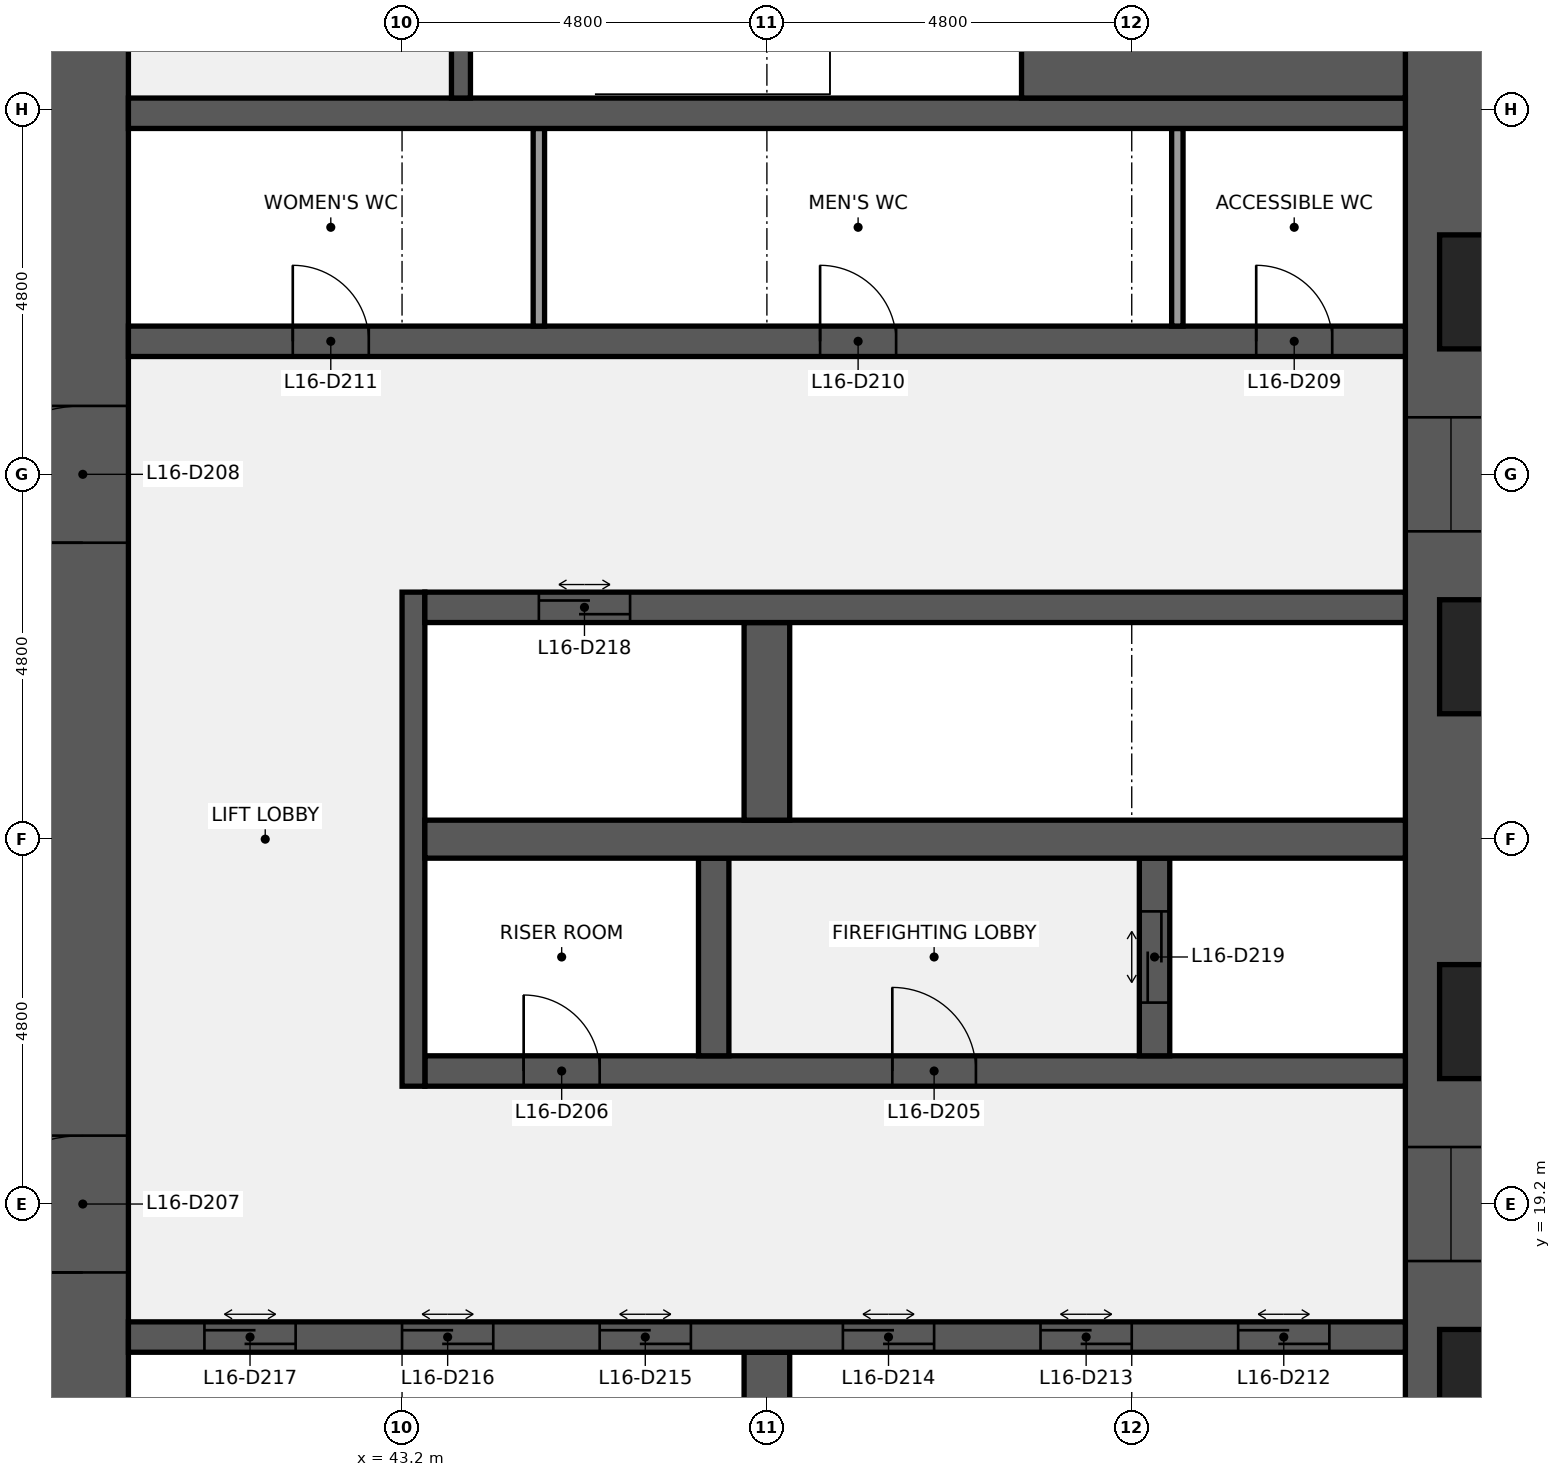
"""IFC4 building model, lengths in metres.
Left out: names, types, materials, properties, quantities, classifications, styles, units other than length and angle.
Written with IfcOpenShell. Run it as: python <this file> out.ifc"""

import sys

from ifc_helpers import new_model, si_unit, direction, frame, frame_2d, origin, place, context, subcontext, project, spatial, rectangle, extrude, element, fill, save


model = new_model("IFC4")
c1 = context("Model", 3, precision=1e-05, world=origin(), true_north=direction((0.0, 1.0)))
c2 = subcontext(c1, "Body", "Model", "MODEL_VIEW")
j1 = project(units=[si_unit("LENGTHUNIT", "METRE"), si_unit("PLANEANGLEUNIT", "RADIAN")], contexts=[c1])
p1 = place(None, origin())
s1 = spatial("IfcSite", under=j1, at=p1, CompositionType="ELEMENT")
p2 = place(p1, origin())
s2 = spatial("IfcBuilding", under=s1, at=p2, CompositionType="ELEMENT")
p3 = place(p2, frame((0.0, 0.0, 75.0)))
s3 = spatial("IfcBuildingStorey", under=s2, at=p3, CompositionType="ELEMENT", Elevation=75.0)
p4 = place(p3, frame((57.0, 38.4, 0.0), z_axis=(0.0, 0.0, 1.0), x_axis=(0.0, -1.0, 0.0)))
e1 = element("IfcWall", 1, at=p4, inside=s3, PredefinedType="SHEAR", context=c2, shape_type="SweptSolid", body=[
    extrude(rectangle(XDim=28.8, YDim=1.2, at=frame_2d((14.4, 0.0))), origin(), (0.0, 0.0, 1.0), 3.84),
])
p5 = place(p4, frame((18.45, 0.0, 0.9)))
e2 = element("IfcOpeningElement", 2, at=p5, cuts=e1, PredefinedType="OPENING", context=c2, shape_type="SweptSolid", body=[
    extrude(rectangle(XDim=1.5, YDim=1.5, at=frame_2d((0.75, 0.75))), frame((0.0, 0.61, 0.0), z_axis=(0.0, -1.0, 0.0), x_axis=(1.0, 0.0, 0.0)), (0.0, 0.0, 1.0), 1.22),
])
p6 = place(p4, frame((8.85, 0.0, 0.9)))
e3 = element("IfcOpeningElement", 3, at=p6, cuts=e1, PredefinedType="OPENING", context=c2, shape_type="SweptSolid", body=[
    extrude(rectangle(XDim=1.5, YDim=1.5, at=frame_2d((0.75, 0.75))), frame((0.0, 0.61, 0.0), z_axis=(0.0, -1.0, 0.0), x_axis=(1.0, 0.0, 0.0)), (0.0, 0.0, 1.0), 1.22),
])
p7 = place(p3, frame((39.0, 9.6, 0.0), z_axis=(0.0, 0.0, 1.0), x_axis=(0.0, 1.0, 0.0)))
e4 = element("IfcWall", 4, at=p7, inside=s3, PredefinedType="SHEAR", context=c2, shape_type="SweptSolid", body=[
    extrude(rectangle(XDim=28.8, YDim=1.2, at=frame_2d((14.4, 0.0))), origin(), (0.0, 0.0, 1.0), 3.84),
])
p8 = place(p7, frame((8.7, 0.0, 0.0)))
e5 = element("IfcOpeningElement", 5, at=p8, cuts=e4, PredefinedType="OPENING", context=c2, shape_type="SweptSolid", body=[
    extrude(rectangle(XDim=1.8, YDim=2.1, at=frame_2d((0.9, 1.05))), frame((0.0, 0.61, 0.0), z_axis=(0.0, -1.0, 0.0), x_axis=(1.0, 0.0, 0.0)), (0.0, 0.0, 1.0), 1.22),
])
p9 = place(p7, frame((18.3, 0.0, 0.0)))
e6 = element("IfcOpeningElement", 6, at=p9, cuts=e4, PredefinedType="OPENING", context=c2, shape_type="SweptSolid", body=[
    extrude(rectangle(XDim=1.8, YDim=2.1, at=frame_2d((0.9, 1.05))), frame((0.0, 0.61, 0.0), z_axis=(0.0, -1.0, 0.0), x_axis=(1.0, 0.0, 0.0)), (0.0, 0.0, 1.0), 1.22),
])
p10 = place(p3, frame((48.0, 14.65, 0.0), z_axis=(0.0, 0.0, 1.0), x_axis=(0.0, 1.0, 0.0)))
e7 = element("IfcWall", 7, at=p10, inside=s3, PredefinedType="SHEAR", context=c2, shape_type="SweptSolid", body=[
    extrude(rectangle(XDim=2.6, YDim=0.6, at=frame_2d((1.3, 0.0))), origin(), (0.0, 0.0, 1.0), 3.84),
])
p11 = place(p3, frame((39.6, 17.45, 0.0), z_axis=(0.0, 0.0, 1.0), x_axis=(1.0, 0.0, 0.0)))
e8 = element("IfcWall", 8, at=p11, inside=s3, PredefinedType="SHEAR", context=c2, shape_type="SweptSolid", body=[
    extrude(rectangle(XDim=16.8, YDim=0.4, at=frame_2d((8.4, 0.0))), origin(), (0.0, 0.0, 1.0), 3.84),
])
p12 = place(p11, frame((14.6, 0.0, 0.0)))
e9 = element("IfcOpeningElement", 9, at=p12, cuts=e8, PredefinedType="OPENING", context=c2, shape_type="SweptSolid", body=[
    extrude(rectangle(XDim=1.2, YDim=2.1, at=frame_2d((0.6, 1.05))), frame((0.0, 0.21, 0.0), z_axis=(0.0, -1.0, 0.0), x_axis=(1.0, 0.0, 0.0)), (0.0, 0.0, 1.0), 0.42),
])
p13 = place(p11, frame((12.0, 0.0, 0.0)))
e10 = element("IfcOpeningElement", 10, at=p13, cuts=e8, PredefinedType="OPENING", context=c2, shape_type="SweptSolid", body=[
    extrude(rectangle(XDim=1.2, YDim=2.1, at=frame_2d((0.6, 1.05))), frame((0.0, 0.21, 0.0), z_axis=(0.0, -1.0, 0.0), x_axis=(1.0, 0.0, 0.0)), (0.0, 0.0, 1.0), 0.42),
])
p14 = place(p11, frame((9.4, 0.0, 0.0)))
e11 = element("IfcOpeningElement", 11, at=p14, cuts=e8, PredefinedType="OPENING", context=c2, shape_type="SweptSolid", body=[
    extrude(rectangle(XDim=1.2, YDim=2.1, at=frame_2d((0.6, 1.05))), frame((0.0, 0.21, 0.0), z_axis=(0.0, -1.0, 0.0), x_axis=(1.0, 0.0, 0.0)), (0.0, 0.0, 1.0), 0.42),
])
p15 = place(p11, frame((6.2, 0.0, 0.0)))
e12 = element("IfcOpeningElement", 12, at=p15, cuts=e8, PredefinedType="OPENING", context=c2, shape_type="SweptSolid", body=[
    extrude(rectangle(XDim=1.2, YDim=2.1, at=frame_2d((0.6, 1.05))), frame((0.0, 0.21, 0.0), z_axis=(0.0, -1.0, 0.0), x_axis=(1.0, 0.0, 0.0)), (0.0, 0.0, 1.0), 0.42),
])
p16 = place(p11, frame((3.6, 0.0, 0.0)))
e13 = element("IfcOpeningElement", 13, at=p16, cuts=e8, PredefinedType="OPENING", context=c2, shape_type="SweptSolid", body=[
    extrude(rectangle(XDim=1.2, YDim=2.1, at=frame_2d((0.6, 1.05))), frame((0.0, 0.21, 0.0), z_axis=(0.0, -1.0, 0.0), x_axis=(1.0, 0.0, 0.0)), (0.0, 0.0, 1.0), 0.42),
])
p17 = place(p11, frame((1.0, 0.0, 0.0)))
e14 = element("IfcOpeningElement", 14, at=p17, cuts=e8, PredefinedType="OPENING", context=c2, shape_type="SweptSolid", body=[
    extrude(rectangle(XDim=1.2, YDim=2.1, at=frame_2d((0.6, 1.05))), frame((0.0, 0.21, 0.0), z_axis=(0.0, -1.0, 0.0), x_axis=(1.0, 0.0, 0.0)), (0.0, 0.0, 1.0), 0.42),
])
p18 = place(p3, frame((43.5, 20.95, 0.0), z_axis=(0.0, 0.0, 1.0), x_axis=(1.0, 0.0, 0.0)))
e15 = element("IfcWall", 15, at=p18, inside=s3, PredefinedType="SHEAR", context=c2, shape_type="SweptSolid", body=[
    extrude(rectangle(XDim=12.9, YDim=0.4, at=frame_2d((6.45, 0.0))), origin(), (0.0, 0.0, 1.0), 3.84),
])
p19 = place(p18, frame((6.15, 0.0, 0.0)))
e16 = element("IfcOpeningElement", 16, at=p19, cuts=e15, PredefinedType="OPENING", context=c2, shape_type="SweptSolid", body=[
    extrude(rectangle(XDim=1.1, YDim=2.1, at=frame_2d((0.55, 1.05))), frame((0.0, 0.21, 0.0), z_axis=(0.0, -1.0, 0.0), x_axis=(1.0, 0.0, 0.0)), (0.0, 0.0, 1.0), 0.42),
])
p20 = place(p18, frame((1.3, 0.0, 0.0)))
e17 = element("IfcOpeningElement", 17, at=p20, cuts=e15, PredefinedType="OPENING", context=c2, shape_type="SweptSolid", body=[
    extrude(rectangle(XDim=1.0, YDim=2.1, at=frame_2d((0.5, 1.05))), frame((0.0, 0.21, 0.0), z_axis=(0.0, -1.0, 0.0), x_axis=(1.0, 0.0, 0.0)), (0.0, 0.0, 1.0), 0.42),
])
p21 = place(p3, frame((43.35, 20.75, 0.0), z_axis=(0.0, 0.0, 1.0), x_axis=(0.0, 1.0, 0.0)))
e18 = element("IfcWall", 18, at=p21, inside=s3, PredefinedType="SHEAR", context=c2, shape_type="SweptSolid", body=[
    extrude(rectangle(XDim=6.5, YDim=0.3, at=frame_2d((3.25, 0.0))), origin(), (0.0, 0.0, 1.0), 3.84),
])
p22 = place(p3, frame((53.1, 21.15, 0.0), z_axis=(0.0, 0.0, 1.0), x_axis=(0.0, 1.0, 0.0)))
e19 = element("IfcWall", 19, at=p22, inside=s3, PredefinedType="SHEAR", context=c2, shape_type="SweptSolid", body=[
    extrude(rectangle(XDim=2.6, YDim=0.4, at=frame_2d((1.3, 0.0))), origin(), (0.0, 0.0, 1.0), 3.84),
])
p23 = place(p22, frame((0.7, 0.0, 0.0)))
e20 = element("IfcOpeningElement", 20, at=p23, cuts=e19, PredefinedType="OPENING", context=c2, shape_type="SweptSolid", body=[
    extrude(rectangle(XDim=1.2, YDim=2.1, at=frame_2d((0.6, 1.05))), frame((0.0, 0.21, 0.0), z_axis=(0.0, -1.0, 0.0), x_axis=(1.0, 0.0, 0.0)), (0.0, 0.0, 1.0), 0.42),
])
p24 = place(p3, frame((47.3, 21.15, 0.0), z_axis=(0.0, 0.0, 1.0), x_axis=(0.0, 1.0, 0.0)))
e21 = element("IfcWall", 21, at=p24, inside=s3, PredefinedType="SHEAR", context=c2, shape_type="SweptSolid", body=[
    extrude(rectangle(XDim=2.6, YDim=0.4, at=frame_2d((1.3, 0.0))), origin(), (0.0, 0.0, 1.0), 3.84),
])
p25 = place(p3, frame((43.5, 24.0, 0.0), z_axis=(0.0, 0.0, 1.0), x_axis=(1.0, 0.0, 0.0)))
e22 = element("IfcWall", 22, at=p25, inside=s3, PredefinedType="SHEAR", context=c2, shape_type="SweptSolid", body=[
    extrude(rectangle(XDim=12.9, YDim=0.5, at=frame_2d((6.45, 0.0))), origin(), (0.0, 0.0, 1.0), 3.84),
])
p26 = place(p3, frame((48.0, 24.25, 0.0), z_axis=(0.0, 0.0, 1.0), x_axis=(0.0, 1.0, 0.0)))
e23 = element("IfcWall", 23, at=p26, inside=s3, PredefinedType="SHEAR", context=c2, shape_type="SweptSolid", body=[
    extrude(rectangle(XDim=2.6, YDim=0.6, at=frame_2d((1.3, 0.0))), origin(), (0.0, 0.0, 1.0), 3.84),
])
p27 = place(p3, frame((43.5, 27.05, 0.0), z_axis=(0.0, 0.0, 1.0), x_axis=(1.0, 0.0, 0.0)))
e24 = element("IfcWall", 24, at=p27, inside=s3, PredefinedType="SHEAR", context=c2, shape_type="SweptSolid", body=[
    extrude(rectangle(XDim=12.9, YDim=0.4, at=frame_2d((6.45, 0.0))), origin(), (0.0, 0.0, 1.0), 3.84),
])
p28 = place(p27, frame((1.5, 0.0, 0.0)))
e25 = element("IfcOpeningElement", 25, at=p28, cuts=e24, PredefinedType="OPENING", context=c2, shape_type="SweptSolid", body=[
    extrude(rectangle(XDim=1.2, YDim=2.1, at=frame_2d((0.6, 1.05))), frame((0.0, 0.21, 0.0), z_axis=(0.0, -1.0, 0.0), x_axis=(1.0, 0.0, 0.0)), (0.0, 0.0, 1.0), 0.42),
])
p29 = place(p3, frame((39.6, 30.55, 0.0), z_axis=(0.0, 0.0, 1.0), x_axis=(1.0, 0.0, 0.0)))
e26 = element("IfcWall", 26, at=p29, inside=s3, PredefinedType="SHEAR", context=c2, shape_type="SweptSolid", body=[
    extrude(rectangle(XDim=16.8, YDim=0.4, at=frame_2d((8.4, 0.0))), origin(), (0.0, 0.0, 1.0), 3.84),
])
p30 = place(p29, frame((14.837, 0.0, 0.0)))
e27 = element("IfcOpeningElement", 27, at=p30, cuts=e26, PredefinedType="OPENING", context=c2, shape_type="SweptSolid", body=[
    extrude(rectangle(XDim=1.0, YDim=2.1, at=frame_2d((0.5, 1.05))), frame((0.0, 0.21, 0.0), z_axis=(0.0, -1.0, 0.0), x_axis=(1.0, 0.0, 0.0)), (0.0, 0.0, 1.0), 0.42),
])
p31 = place(p29, frame((9.1, 0.0, 0.0)))
e28 = element("IfcOpeningElement", 28, at=p31, cuts=e26, PredefinedType="OPENING", context=c2, shape_type="SweptSolid", body=[
    extrude(rectangle(XDim=1.0, YDim=2.1, at=frame_2d((0.5, 1.05))), frame((0.0, 0.21, 0.0), z_axis=(0.0, -1.0, 0.0), x_axis=(1.0, 0.0, 0.0)), (0.0, 0.0, 1.0), 0.42),
])
p32 = place(p29, frame((2.163, 0.0, 0.0)))
e29 = element("IfcOpeningElement", 29, at=p32, cuts=e26, PredefinedType="OPENING", context=c2, shape_type="SweptSolid", body=[
    extrude(rectangle(XDim=1.0, YDim=2.1, at=frame_2d((0.5, 1.05))), frame((0.0, 0.21, 0.0), z_axis=(0.0, -1.0, 0.0), x_axis=(1.0, 0.0, 0.0)), (0.0, 0.0, 1.0), 0.42),
])
for number, where, z_axis, x_axis in (
    (30, (53.4, 30.75, 0.0), (0.0, 0.0, 1.0), (0.0, 1.0, 0.0)),
    (31, (45.0, 30.75, 0.0), (0.0, 0.0, 1.0), (0.0, 1.0, 0.0)),
):
    element("IfcWall", number, at=place(p3, frame(where, z_axis=z_axis, x_axis=x_axis)), inside=s3, PredefinedType="PARTITIONING", context=c2, shape_type="SweptSolid", body=[
        extrude(rectangle(XDim=2.6, YDim=0.15, at=frame_2d((1.3, 0.0))), origin(), (0.0, 0.0, 1.0), 3.84),
    ])
p33 = place(p3, frame((39.6, 33.55, 0.0), z_axis=(0.0, 0.0, 1.0), x_axis=(1.0, 0.0, 0.0)))
e32 = element("IfcWall", 32, at=p33, inside=s3, PredefinedType="SHEAR", context=c2, shape_type="SweptSolid", body=[
    extrude(rectangle(XDim=16.8, YDim=0.4, at=frame_2d((8.4, 0.0))), origin(), (0.0, 0.0, 1.0), 3.84),
])
p34 = place(p3, frame((51.35, 35.475, 0.0), z_axis=(0.0, 0.0, 1.0), x_axis=(1.0, 0.0, 0.0)))
e33 = element("IfcWall", 33, at=p34, inside=s3, PredefinedType="SHEAR", context=c2, shape_type="SweptSolid", body=[
    extrude(rectangle(XDim=5.05, YDim=3.45, at=frame_2d((2.525, 0.0))), origin(), (0.0, 0.0, 1.0), 3.84),
])
p35 = place(p3, frame((43.975, 33.75, 0.0), z_axis=(0.0, 0.0, 1.0), x_axis=(0.0, 1.0, 0.0)))
e34 = element("IfcWall", 34, at=p35, inside=s3, PredefinedType="SHEAR", context=c2, shape_type="SweptSolid", body=[
    extrude(rectangle(XDim=3.45, YDim=0.25, at=frame_2d((1.725, 0.0))), origin(), (0.0, 0.0, 1.0), 3.84),
])
p36 = place(p35, frame((1.175, 0.0, 0.0)))
e35 = element("IfcOpeningElement", 35, at=p36, cuts=e34, PredefinedType="OPENING", context=c2, shape_type="SweptSolid", body=[
    extrude(rectangle(XDim=1.1, YDim=2.1, at=frame_2d((0.55, 1.05))), frame((0.0, 0.135, 0.0), z_axis=(0.0, -1.0, 0.0), x_axis=(1.0, 0.0, 0.0)), (0.0, 0.0, 1.0), 0.27),
])
p37 = place(p19, origin())
e36 = element("IfcDoor", 36, at=p37, inside=s3, OperationType="SINGLE_SWING_LEFT", PredefinedType="DOOR", context=c2, shape_type="SweptSolid", body=[
    extrude(rectangle(XDim=1.1, YDim=2.1, at=frame_2d((0.55, 1.05))), frame((0.0, 0.025, 0.0), z_axis=(0.0, -1.0, 0.0), x_axis=(1.0, 0.0, 0.0)), (0.0, 0.0, 1.0), 0.05),
])
fill(e16, e36)
p38 = place(p20, origin())
e37 = element("IfcDoor", 37, at=p38, inside=s3, OperationType="SINGLE_SWING_LEFT", PredefinedType="DOOR", context=c2, shape_type="SweptSolid", body=[
    extrude(rectangle(XDim=1.0, YDim=2.1, at=frame_2d((0.5, 1.05))), frame((0.0, 0.025, 0.0), z_axis=(0.0, -1.0, 0.0), x_axis=(1.0, 0.0, 0.0)), (0.0, 0.0, 1.0), 0.05),
])
fill(e17, e37)
p39 = place(p8, origin())
e38 = element("IfcDoor", 38, at=p39, inside=s3, OperationType="DOUBLE_DOOR_SINGLE_SWING", PredefinedType="DOOR", context=c2, shape_type="SweptSolid", body=[
    extrude(rectangle(XDim=1.8, YDim=2.1, at=frame_2d((0.9, 1.05))), frame((0.0, 0.025, 0.0), z_axis=(0.0, -1.0, 0.0), x_axis=(1.0, 0.0, 0.0)), (0.0, 0.0, 1.0), 0.05),
])
fill(e5, e38)
p40 = place(p9, origin())
e39 = element("IfcDoor", 39, at=p40, inside=s3, OperationType="DOUBLE_DOOR_SINGLE_SWING", PredefinedType="DOOR", context=c2, shape_type="SweptSolid", body=[
    extrude(rectangle(XDim=1.8, YDim=2.1, at=frame_2d((0.9, 1.05))), frame((0.0, 0.025, 0.0), z_axis=(0.0, -1.0, 0.0), x_axis=(1.0, 0.0, 0.0)), (0.0, 0.0, 1.0), 0.05),
])
fill(e6, e39)
p41 = place(p30, origin())
e40 = element("IfcDoor", 40, at=p41, inside=s3, OperationType="SINGLE_SWING_LEFT", PredefinedType="DOOR", context=c2, shape_type="SweptSolid", body=[
    extrude(rectangle(XDim=1.0, YDim=2.1, at=frame_2d((0.5, 1.05))), frame((0.0, 0.025, 0.0), z_axis=(0.0, -1.0, 0.0), x_axis=(1.0, 0.0, 0.0)), (0.0, 0.0, 1.0), 0.05),
])
fill(e27, e40)
p42 = place(p31, origin())
e41 = element("IfcDoor", 41, at=p42, inside=s3, OperationType="SINGLE_SWING_LEFT", PredefinedType="DOOR", context=c2, shape_type="SweptSolid", body=[
    extrude(rectangle(XDim=1.0, YDim=2.1, at=frame_2d((0.5, 1.05))), frame((0.0, 0.025, 0.0), z_axis=(0.0, -1.0, 0.0), x_axis=(1.0, 0.0, 0.0)), (0.0, 0.0, 1.0), 0.05),
])
fill(e28, e41)
p43 = place(p32, origin())
e42 = element("IfcDoor", 42, at=p43, inside=s3, OperationType="SINGLE_SWING_LEFT", PredefinedType="DOOR", context=c2, shape_type="SweptSolid", body=[
    extrude(rectangle(XDim=1.0, YDim=2.1, at=frame_2d((0.5, 1.05))), frame((0.0, 0.025, 0.0), z_axis=(0.0, -1.0, 0.0), x_axis=(1.0, 0.0, 0.0)), (0.0, 0.0, 1.0), 0.05),
])
fill(e29, e42)
p44 = place(p12, origin())
e43 = element("IfcDoor", 43, at=p44, inside=s3, OperationType="DOUBLE_DOOR_SLIDING", PredefinedType="DOOR", context=c2, shape_type="SweptSolid", body=[
    extrude(rectangle(XDim=1.2, YDim=2.1, at=frame_2d((0.6, 1.05))), frame((0.0, 0.025, 0.0), z_axis=(0.0, -1.0, 0.0), x_axis=(1.0, 0.0, 0.0)), (0.0, 0.0, 1.0), 0.05),
])
fill(e9, e43)
p45 = place(p13, origin())
e44 = element("IfcDoor", 44, at=p45, inside=s3, OperationType="DOUBLE_DOOR_SLIDING", PredefinedType="DOOR", context=c2, shape_type="SweptSolid", body=[
    extrude(rectangle(XDim=1.2, YDim=2.1, at=frame_2d((0.6, 1.05))), frame((0.0, 0.025, 0.0), z_axis=(0.0, -1.0, 0.0), x_axis=(1.0, 0.0, 0.0)), (0.0, 0.0, 1.0), 0.05),
])
fill(e10, e44)
p46 = place(p14, origin())
e45 = element("IfcDoor", 45, at=p46, inside=s3, OperationType="DOUBLE_DOOR_SLIDING", PredefinedType="DOOR", context=c2, shape_type="SweptSolid", body=[
    extrude(rectangle(XDim=1.2, YDim=2.1, at=frame_2d((0.6, 1.05))), frame((0.0, 0.025, 0.0), z_axis=(0.0, -1.0, 0.0), x_axis=(1.0, 0.0, 0.0)), (0.0, 0.0, 1.0), 0.05),
])
fill(e11, e45)
p47 = place(p15, origin())
e46 = element("IfcDoor", 46, at=p47, inside=s3, OperationType="DOUBLE_DOOR_SLIDING", PredefinedType="DOOR", context=c2, shape_type="SweptSolid", body=[
    extrude(rectangle(XDim=1.2, YDim=2.1, at=frame_2d((0.6, 1.05))), frame((0.0, 0.025, 0.0), z_axis=(0.0, -1.0, 0.0), x_axis=(1.0, 0.0, 0.0)), (0.0, 0.0, 1.0), 0.05),
])
fill(e12, e46)
p48 = place(p16, origin())
e47 = element("IfcDoor", 47, at=p48, inside=s3, OperationType="DOUBLE_DOOR_SLIDING", PredefinedType="DOOR", context=c2, shape_type="SweptSolid", body=[
    extrude(rectangle(XDim=1.2, YDim=2.1, at=frame_2d((0.6, 1.05))), frame((0.0, 0.025, 0.0), z_axis=(0.0, -1.0, 0.0), x_axis=(1.0, 0.0, 0.0)), (0.0, 0.0, 1.0), 0.05),
])
fill(e13, e47)
p49 = place(p17, origin())
e48 = element("IfcDoor", 48, at=p49, inside=s3, OperationType="DOUBLE_DOOR_SLIDING", PredefinedType="DOOR", context=c2, shape_type="SweptSolid", body=[
    extrude(rectangle(XDim=1.2, YDim=2.1, at=frame_2d((0.6, 1.05))), frame((0.0, 0.025, 0.0), z_axis=(0.0, -1.0, 0.0), x_axis=(1.0, 0.0, 0.0)), (0.0, 0.0, 1.0), 0.05),
])
fill(e14, e48)
p50 = place(p28, origin())
e49 = element("IfcDoor", 49, at=p50, inside=s3, OperationType="DOUBLE_DOOR_SLIDING", PredefinedType="DOOR", context=c2, shape_type="SweptSolid", body=[
    extrude(rectangle(XDim=1.2, YDim=2.1, at=frame_2d((0.6, 1.05))), frame((0.0, 0.025, 0.0), z_axis=(0.0, -1.0, 0.0), x_axis=(1.0, 0.0, 0.0)), (0.0, 0.0, 1.0), 0.05),
])
fill(e25, e49)
p51 = place(p23, origin())
e50 = element("IfcDoor", 50, at=p51, inside=s3, OperationType="DOUBLE_DOOR_SLIDING", PredefinedType="DOOR", context=c2, shape_type="SweptSolid", body=[
    extrude(rectangle(XDim=1.2, YDim=2.1, at=frame_2d((0.6, 1.05))), frame((0.0, 0.025, 0.0), z_axis=(0.0, -1.0, 0.0), x_axis=(1.0, 0.0, 0.0)), (0.0, 0.0, 1.0), 0.05),
])
fill(e20, e50)
p52 = place(p5, origin())
e51 = element("IfcWindow", 51, at=p52, inside=s3, PartitioningType="SINGLE_PANEL", PredefinedType="WINDOW", context=c2, shape_type="SweptSolid", body=[
    extrude(rectangle(XDim=1.5, YDim=1.5, at=frame_2d((0.75, 0.75))), frame((0.0, 0.03, 0.0), z_axis=(0.0, -1.0, 0.0), x_axis=(1.0, 0.0, 0.0)), (0.0, 0.0, 1.0), 0.06),
])
fill(e2, e51)
p53 = place(p6, origin())
e52 = element("IfcWindow", 52, at=p53, inside=s3, PartitioningType="SINGLE_PANEL", PredefinedType="WINDOW", context=c2, shape_type="SweptSolid", body=[
    extrude(rectangle(XDim=1.5, YDim=1.5, at=frame_2d((0.75, 0.75))), frame((0.0, 0.03, 0.0), z_axis=(0.0, -1.0, 0.0), x_axis=(1.0, 0.0, 0.0)), (0.0, 0.0, 1.0), 0.06),
])
fill(e3, e52)
save(model, sys.argv[1])
